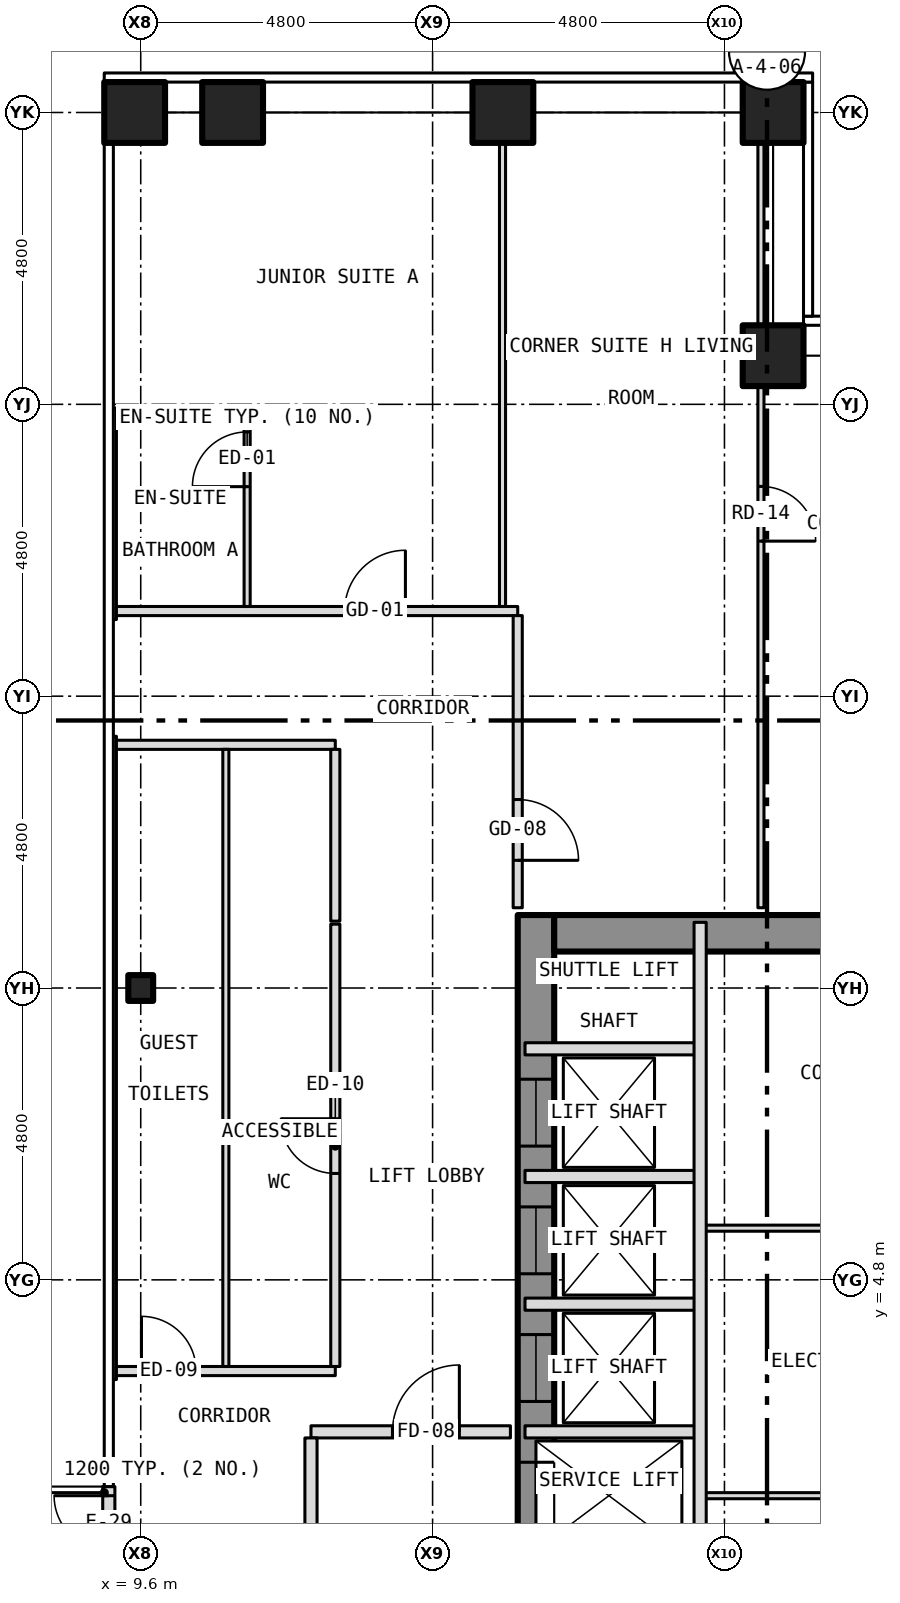
"""IFC4 building model, lengths in metres.
Left out: names, types, materials, properties, quantities, classifications, styles, units other than length and angle.
Written with IfcOpenShell. Run it as: python <this file> out.ifc"""

import sys

from ifc_helpers import new_model, si_unit, direction, frame, frame_2d, origin, origin_2d, place, context, subcontext, project, spatial, rectangle, hollow_rectangle, i_section, extrude, element, fill, save


model = new_model("IFC4")
c1 = context("Model", 3, precision=1e-05, world=origin(), true_north=direction((0.0, 1.0)))
c2 = subcontext(c1, "Body", "Model", "MODEL_VIEW")
j1 = project(units=[si_unit("LENGTHUNIT", "METRE"), si_unit("PLANEANGLEUNIT", "RADIAN")], contexts=[c1])
p1 = place(None, origin())
s1 = spatial("IfcSite", under=j1, at=p1, CompositionType="ELEMENT")
p2 = place(p1, origin())
s2 = spatial("IfcBuilding", under=s1, at=p2, CompositionType="ELEMENT")
p3 = place(p2, frame((0.0, 0.0, 70.5)))
s3 = spatial("IfcBuildingStorey", under=s2, at=p3, CompositionType="ELEMENT", Elevation=70.5)
for number, where, z_axis, x_axis in (
    (1, (11.111, 24.0, -0.15), (0.0, 0.0, 1.0), (1.0, 0.0, 0.0)),
    (2, (15.556, 24.0, -0.15), (0.0, 0.0, 1.0), (1.0, 0.0, 0.0)),
    (3, (20.0, 24.0, -0.15), (0.0, 0.0, 1.0), (1.0, 0.0, 0.0)),
    (4, (20.0, 20.0, -0.15), (0.0, 0.0, 1.0), (1.0, 0.0, 0.0)),
    (5, (9.5, 24.0, -0.15), (0.0, 0.0, 1.0), (1.0, 0.0, 0.0)),
):
    element("IfcColumn", number, at=place(p3, frame(where, z_axis=z_axis, x_axis=x_axis)), inside=s3, PredefinedType="COLUMN", context=c2, shape_type="SweptSolid", body=[
        extrude(hollow_rectangle(XDim=1.0, YDim=1.0, WallThickness=0.06, at=origin_2d()), origin(), (0.0, 0.0, 1.0), 3.5),
    ])
p4 = place(p3, frame((9.6, 9.6, -0.15), z_axis=(0.0, 0.0, 1.0), x_axis=(1.0, 0.0, 0.0)))
e6 = element("IfcColumn", 6, at=p4, inside=s3, PredefinedType="COLUMN", context=c2, shape_type="SweptSolid", body=[
    extrude(i_section(OverallWidth=0.409, OverallDepth=0.424, WebThickness=0.033, FlangeThickness=0.052, at=origin_2d()), origin(), (0.0, 0.0, 1.0), 3.5),
])
p5 = place(p3, frame((16.1, -10.8, 0.0), z_axis=(0.0, 0.0, 1.0), x_axis=(0.0, 1.0, 0.0)))
e7 = element("IfcWall", 7, at=p5, inside=s3, PredefinedType="SHEAR", context=c2, shape_type="SweptSolid", body=[
    extrude(rectangle(XDim=21.6, YDim=0.6, at=frame_2d((10.8, 0.0))), origin(), (0.0, 0.0, 1.0), 3.25),
])
p6 = place(p5, frame((9.4, 0.0, 0.0)))
e8 = element("IfcOpeningElement", 8, at=p6, cuts=e7, PredefinedType="OPENING", context=c2, shape_type="SweptSolid", body=[
    extrude(rectangle(XDim=1.1, YDim=2.1, at=frame_2d((0.55, 1.05))), frame((0.0, 0.312, 0.0), z_axis=(0.0, -1.0, 0.0), x_axis=(1.0, 0.0, 0.0)), (0.0, 0.0, 1.0), 0.624),
])
p7 = place(p5, frame((11.5, 0.0, 0.0)))
e9 = element("IfcOpeningElement", 9, at=p7, cuts=e7, PredefinedType="OPENING", context=c2, shape_type="SweptSolid", body=[
    extrude(rectangle(XDim=1.1, YDim=2.1, at=frame_2d((0.55, 1.05))), frame((0.0, 0.312, 0.0), z_axis=(0.0, -1.0, 0.0), x_axis=(1.0, 0.0, 0.0)), (0.0, 0.0, 1.0), 0.624),
])
p8 = place(p5, frame((13.6, 0.0, 0.0)))
e10 = element("IfcOpeningElement", 10, at=p8, cuts=e7, PredefinedType="OPENING", context=c2, shape_type="SweptSolid", body=[
    extrude(rectangle(XDim=1.1, YDim=2.1, at=frame_2d((0.55, 1.05))), frame((0.0, 0.312, 0.0), z_axis=(0.0, -1.0, 0.0), x_axis=(1.0, 0.0, 0.0)), (0.0, 0.0, 1.0), 0.624),
])
p9 = place(p5, frame((15.7, 0.0, 0.0)))
e11 = element("IfcOpeningElement", 11, at=p9, cuts=e7, PredefinedType="OPENING", context=c2, shape_type="SweptSolid", body=[
    extrude(rectangle(XDim=1.1, YDim=2.1, at=frame_2d((0.55, 1.05))), frame((0.0, 0.312, 0.0), z_axis=(0.0, -1.0, 0.0), x_axis=(1.0, 0.0, 0.0)), (0.0, 0.0, 1.0), 0.624),
])
p10 = place(p5, frame((17.8, 0.0, 0.0)))
e12 = element("IfcOpeningElement", 12, at=p10, cuts=e7, PredefinedType="OPENING", context=c2, shape_type="SweptSolid", body=[
    extrude(rectangle(XDim=1.1, YDim=2.1, at=frame_2d((0.55, 1.05))), frame((0.0, 0.312, 0.0), z_axis=(0.0, -1.0, 0.0), x_axis=(1.0, 0.0, 0.0)), (0.0, 0.0, 1.0), 0.624),
])
p11 = place(p5, frame((5.642, 0.0, 0.0)))
e13 = element("IfcOpeningElement", 13, at=p11, cuts=e7, PredefinedType="OPENING", context=c2, shape_type="SweptSolid", body=[
    extrude(rectangle(XDim=1.1, YDim=2.1, at=frame_2d((0.55, 1.05))), frame((0.0, 0.312, 0.0), z_axis=(0.0, -1.0, 0.0), x_axis=(1.0, 0.0, 0.0)), (0.0, 0.0, 1.0), 0.624),
])
p12 = place(p5, frame((7.5, 0.0, 0.0)))
e14 = element("IfcOpeningElement", 14, at=p12, cuts=e7, PredefinedType="OPENING", context=c2, shape_type="SweptSolid", body=[
    extrude(rectangle(XDim=1.1, YDim=2.1, at=frame_2d((0.55, 1.05))), frame((0.0, 0.312, 0.0), z_axis=(0.0, -1.0, 0.0), x_axis=(1.0, 0.0, 0.0)), (0.0, 0.0, 1.0), 0.624),
])
p13 = place(p3, frame((16.4, 10.5, 0.0), z_axis=(0.0, 0.0, 1.0), x_axis=(1.0, 0.0, 0.0)))
e15 = element("IfcWall", 15, at=p13, inside=s3, PredefinedType="SHEAR", context=c2, shape_type="SweptSolid", body=[
    extrude(rectangle(XDim=7.0, YDim=0.6, at=frame_2d((3.5, 0.0))), origin(), (0.0, 0.0, 1.0), 3.25),
])
p14 = place(p3, frame((9.075, -1.4, 0.0), z_axis=(0.0, 0.0, 1.0), x_axis=(0.0, 1.0, 0.0)))
e16 = element("IfcWall", 16, at=p14, inside=s3, PredefinedType="SOLIDWALL", context=c2, shape_type="SweptSolid", body=[
    extrude(rectangle(XDim=2.8, YDim=0.2, at=frame_2d((1.4, 0.0))), origin(), (0.0, 0.0, 1.0), 3.5),
])
p15 = place(p14, frame((0.15, 0.0, 0.0)))
e17 = element("IfcOpeningElement", 17, at=p15, cuts=e16, PredefinedType="OPENING", context=c2, shape_type="SweptSolid", body=[
    extrude(rectangle(XDim=0.9, YDim=2.1, at=frame_2d((0.45, 1.05))), frame((0.0, 0.112, 0.0), z_axis=(0.0, -1.0, 0.0), x_axis=(1.0, 0.0, 0.0)), (0.0, 0.0, 1.0), 0.224),
])
p16 = place(p14, frame((1.75, 0.0, 0.0)))
e18 = element("IfcOpeningElement", 18, at=p16, cuts=e16, PredefinedType="OPENING", context=c2, shape_type="SweptSolid", body=[
    extrude(rectangle(XDim=0.9, YDim=2.1, at=frame_2d((0.45, 1.05))), frame((0.0, 0.112, 0.0), z_axis=(0.0, -1.0, 0.0), x_axis=(1.0, 0.0, 0.0)), (0.0, 0.0, 1.0), 0.224),
])
p17 = place(p3, frame((18.8, 1.25, 0.0), z_axis=(0.0, 0.0, 1.0), x_axis=(1.0, 0.0, 0.0)))
e19 = element("IfcWall", 19, at=p17, inside=s3, PredefinedType="PARTITIONING", context=c2, shape_type="SweptSolid", body=[
    extrude(rectangle(XDim=5.08, YDim=0.1, at=frame_2d((2.54, 0.0))), origin(), (0.0, 0.0, 1.0), 3.25),
])
p18 = place(p17, frame((2.15, 0.0, 0.0)))
e20 = element("IfcOpeningElement", 20, at=p18, cuts=e19, PredefinedType="OPENING", context=c2, shape_type="SweptSolid", body=[
    extrude(rectangle(XDim=0.9, YDim=2.1, at=frame_2d((0.45, 1.05))), frame((0.0, 0.062, 0.0), z_axis=(0.0, -1.0, 0.0), x_axis=(1.0, 0.0, 0.0)), (0.0, 0.0, 1.0), 0.124),
])
p19 = place(p3, frame((12.4, 2.3, 0.0), z_axis=(0.0, 0.0, 1.0), x_axis=(1.0, 0.0, 0.0)))
e21 = element("IfcWall", 21, at=p19, inside=s3, PredefinedType="PARTITIONING", context=c2, shape_type="SweptSolid", body=[
    extrude(rectangle(XDim=3.28, YDim=0.2, at=frame_2d((1.64, 0.0))), origin(), (0.0, 0.0, 1.0), 3.35),
])
p20 = place(p19, frame((1.34, 0.0, 0.0)))
e22 = element("IfcOpeningElement", 22, at=p20, cuts=e21, PredefinedType="OPENING", context=c2, shape_type="SweptSolid", body=[
    extrude(rectangle(XDim=1.1, YDim=2.1, at=frame_2d((0.55, 1.05))), frame((0.0, 0.112, 0.0), z_axis=(0.0, -1.0, 0.0), x_axis=(1.0, 0.0, 0.0)), (0.0, 0.0, 1.0), 0.224),
])
p21 = place(p3, frame((15.92, 2.3, 0.0), z_axis=(0.0, 0.0, 1.0), x_axis=(1.0, 0.0, 0.0)))
e23 = element("IfcWall", 23, at=p21, inside=s3, PredefinedType="PARTITIONING", context=c2, shape_type="SweptSolid", body=[
    extrude(rectangle(XDim=2.88, YDim=0.2, at=frame_2d((1.44, 0.0))), origin(), (0.0, 0.0, 1.0), 3.25),
])
p22 = place(p3, frame((9.15, 3.3, 0.0), z_axis=(0.0, 0.0, 1.0), x_axis=(1.0, 0.0, 0.0)))
e24 = element("IfcWall", 24, at=p22, inside=s3, PredefinedType="PARTITIONING", context=c2, shape_type="SweptSolid", body=[
    extrude(rectangle(XDim=3.65, YDim=0.15, at=frame_2d((1.825, 0.0))), origin(), (0.0, 0.0, 1.0), 3.35),
])
p23 = place(p22, frame((0.462, 0.0, 0.0)))
e25 = element("IfcOpeningElement", 25, at=p23, cuts=e24, PredefinedType="OPENING", context=c2, shape_type="SweptSolid", body=[
    extrude(rectangle(XDim=0.9, YDim=2.1, at=frame_2d((0.45, 1.05))), frame((0.0, 0.087, 0.0), z_axis=(0.0, -1.0, 0.0), x_axis=(1.0, 0.0, 0.0)), (0.0, 0.0, 1.0), 0.174),
])
p24 = place(p3, frame((15.92, 4.4, 0.0), z_axis=(0.0, 0.0, 1.0), x_axis=(1.0, 0.0, 0.0)))
e26 = element("IfcWall", 26, at=p24, inside=s3, PredefinedType="PARTITIONING", context=c2, shape_type="SweptSolid", body=[
    extrude(rectangle(XDim=2.88, YDim=0.2, at=frame_2d((1.44, 0.0))), origin(), (0.0, 0.0, 1.0), 3.25),
])
p25 = place(p3, frame((18.8, 5.65, 0.0), z_axis=(0.0, 0.0, 1.0), x_axis=(1.0, 0.0, 0.0)))
e27 = element("IfcWall", 27, at=p25, inside=s3, PredefinedType="PARTITIONING", context=c2, shape_type="SweptSolid", body=[
    extrude(rectangle(XDim=5.08, YDim=0.1, at=frame_2d((2.54, 0.0))), origin(), (0.0, 0.0, 1.0), 3.25),
])
p26 = place(p25, frame((2.15, 0.0, 0.0)))
e28 = element("IfcOpeningElement", 28, at=p26, cuts=e27, PredefinedType="OPENING", context=c2, shape_type="SweptSolid", body=[
    extrude(rectangle(XDim=0.9, YDim=2.1, at=frame_2d((0.45, 1.05))), frame((0.0, 0.062, 0.0), z_axis=(0.0, -1.0, 0.0), x_axis=(1.0, 0.0, 0.0)), (0.0, 0.0, 1.0), 0.124),
])
for number, where, z_axis, x_axis in (
    (29, (15.92, 6.5, 0.0), (0.0, 0.0, 1.0), (1.0, 0.0, 0.0)),
    (30, (15.92, 8.6, 0.0), (0.0, 0.0, 1.0), (1.0, 0.0, 0.0)),
):
    element("IfcWall", number, at=place(p3, frame(where, z_axis=z_axis, x_axis=x_axis)), inside=s3, PredefinedType="PARTITIONING", context=c2, shape_type="SweptSolid", body=[
        extrude(rectangle(XDim=2.88, YDim=0.2, at=frame_2d((1.44, 0.0))), origin(), (0.0, 0.0, 1.0), 3.25),
    ])
p27 = place(p3, frame((9.15, 13.6, 0.0), z_axis=(0.0, 0.0, 1.0), x_axis=(1.0, 0.0, 0.0)))
e31 = element("IfcWall", 31, at=p27, inside=s3, PredefinedType="PARTITIONING", context=c2, shape_type="SweptSolid", body=[
    extrude(rectangle(XDim=3.65, YDim=0.15, at=frame_2d((1.825, 0.0))), origin(), (0.0, 0.0, 1.0), 3.35),
])
p28 = place(p3, frame((9.15, 15.8, 0.0), z_axis=(0.0, 0.0, 1.0), x_axis=(1.0, 0.0, 0.0)))
e32 = element("IfcWall", 32, at=p28, inside=s3, PredefinedType="PARTITIONING", context=c2, shape_type="SweptSolid", body=[
    extrude(rectangle(XDim=6.65, YDim=0.15, at=frame_2d((3.325, 0.0))), origin(), (0.0, 0.0, 1.0), 3.35),
])
p29 = place(p28, frame((3.803, 0.0, 0.0)))
e33 = element("IfcOpeningElement", 33, at=p29, cuts=e32, PredefinedType="OPENING", context=c2, shape_type="SweptSolid", body=[
    extrude(rectangle(XDim=1.0, YDim=2.1, at=frame_2d((0.5, 1.05))), frame((0.0, 0.087, 0.0), z_axis=(0.0, -1.0, 0.0), x_axis=(1.0, 0.0, 0.0)), (0.0, 0.0, 1.0), 0.174),
])
p30 = place(p3, frame((9.15, 19.0, 0.0), z_axis=(0.0, 0.0, 1.0), x_axis=(1.0, 0.0, 0.0)))
e34 = element("IfcWall", 34, at=p30, inside=s3, PredefinedType="PARTITIONING", context=c2, shape_type="SweptSolid", body=[
    extrude(rectangle(XDim=2.2, YDim=0.1, at=frame_2d((1.1, 0.0))), origin(), (0.0, 0.0, 1.0), 3.35),
])
p31 = place(p3, frame((9.15, 3.16, 0.0), z_axis=(0.0, 0.0, 1.0), x_axis=(0.0, 1.0, 0.0)))
e35 = element("IfcWall", 35, at=p31, inside=s3, PredefinedType="PARTITIONING", context=c2, shape_type="SweptSolid", body=[
    extrude(rectangle(XDim=10.58, YDim=0.1, at=frame_2d((5.29, 0.0))), origin(), (0.0, 0.0, 1.0), 2.733),
])
p32 = place(p3, frame((9.15, 15.66, 0.0), z_axis=(0.0, 0.0, 1.0), x_axis=(0.0, 1.0, 0.0)))
e36 = element("IfcWall", 36, at=p32, inside=s3, PredefinedType="PARTITIONING", context=c2, shape_type="SweptSolid", body=[
    extrude(rectangle(XDim=3.48, YDim=0.1, at=frame_2d((1.74, 0.0))), origin(), (0.0, 0.0, 1.0), 2.733),
])
p33 = place(p3, frame((11.0, 3.375, 0.0), z_axis=(0.0, 0.0, 1.0), x_axis=(0.0, 1.0, 0.0)))
e37 = element("IfcWall", 37, at=p33, inside=s3, PredefinedType="PARTITIONING", context=c2, shape_type="SweptSolid", body=[
    extrude(rectangle(XDim=10.15, YDim=0.1, at=frame_2d((5.075, 0.0))), origin(), (0.0, 0.0, 1.0), 3.35),
])
p34 = place(p3, frame((11.35, 15.875, 0.0), z_axis=(0.0, 0.0, 1.0), x_axis=(0.0, 1.0, 0.0)))
e38 = element("IfcWall", 38, at=p34, inside=s3, PredefinedType="PARTITIONING", context=c2, shape_type="SweptSolid", body=[
    extrude(rectangle(XDim=3.075, YDim=0.1, at=frame_2d((1.538, 0.0))), origin(), (0.0, 0.0, 1.0), 3.35),
])
p35 = place(p34, frame((1.971, 0.0, 0.0)))
e39 = element("IfcOpeningElement", 39, at=p35, cuts=e38, PredefinedType="OPENING", context=c2, shape_type="SweptSolid", body=[
    extrude(rectangle(XDim=0.9, YDim=2.1, at=frame_2d((0.45, 1.05))), frame((0.0, 0.062, 0.0), z_axis=(0.0, -1.0, 0.0), x_axis=(1.0, 0.0, 0.0)), (0.0, 0.0, 1.0), 0.124),
])
p36 = place(p3, frame((12.4, -1.8, 0.0), z_axis=(0.0, 0.0, 1.0), x_axis=(0.0, 1.0, 0.0)))
e40 = element("IfcWall", 40, at=p36, inside=s3, PredefinedType="PARTITIONING", context=c2, shape_type="SweptSolid", body=[
    extrude(rectangle(XDim=4.0, YDim=0.2, at=frame_2d((2.0, 0.0))), origin(), (0.0, 0.0, 1.0), 3.35),
])
p37 = place(p36, frame((1.25, 0.0, 0.0)))
e41 = element("IfcOpeningElement", 41, at=p37, cuts=e40, PredefinedType="OPENING", context=c2, shape_type="SweptSolid", body=[
    extrude(rectangle(XDim=1.1, YDim=2.1, at=frame_2d((0.55, 1.05))), frame((0.0, 0.112, 0.0), z_axis=(0.0, -1.0, 0.0), x_axis=(1.0, 0.0, 0.0)), (0.0, 0.0, 1.0), 0.224),
])
p38 = place(p3, frame((12.8, 3.375, 0.0), z_axis=(0.0, 0.0, 1.0), x_axis=(0.0, 1.0, 0.0)))
e42 = element("IfcWall", 42, at=p38, inside=s3, PredefinedType="PARTITIONING", context=c2, shape_type="SweptSolid", body=[
    extrude(rectangle(XDim=7.275, YDim=0.15, at=frame_2d((3.637, 0.0))), origin(), (0.0, 0.0, 1.0), 3.35),
])
p39 = place(p38, frame((3.175, 0.0, 0.0)))
e43 = element("IfcOpeningElement", 43, at=p39, cuts=e42, PredefinedType="OPENING", context=c2, shape_type="SweptSolid", body=[
    extrude(rectangle(XDim=0.9, YDim=2.1, at=frame_2d((0.45, 1.05))), frame((0.0, 0.087, 0.0), z_axis=(0.0, -1.0, 0.0), x_axis=(1.0, 0.0, 0.0)), (0.0, 0.0, 1.0), 0.174),
])
p40 = place(p3, frame((12.8, 10.7, 0.0), z_axis=(0.0, 0.0, 1.0), x_axis=(0.0, 1.0, 0.0)))
e44 = element("IfcWall", 44, at=p40, inside=s3, PredefinedType="PARTITIONING", context=c2, shape_type="SweptSolid", body=[
    extrude(rectangle(XDim=2.825, YDim=0.15, at=frame_2d((1.413, 0.0))), origin(), (0.0, 0.0, 1.0), 3.35),
])
p41 = place(p3, frame((15.55, 15.875, 0.0), z_axis=(0.0, 0.0, 1.0), x_axis=(0.0, 1.0, 0.0)))
e45 = element("IfcWall", 45, at=p41, inside=s3, PredefinedType="PARTITIONING", context=c2, shape_type="SweptSolid", body=[
    extrude(rectangle(XDim=8.005, YDim=0.1, at=frame_2d((4.002, 0.0))), origin(), (0.0, 0.0, 1.0), 3.35),
])
p42 = place(p3, frame((15.8, 10.92, 0.0), z_axis=(0.0, 0.0, 1.0), x_axis=(0.0, 1.0, 0.0)))
e46 = element("IfcWall", 46, at=p42, inside=s3, PredefinedType="PARTITIONING", context=c2, shape_type="SweptSolid", body=[
    extrude(rectangle(XDim=4.805, YDim=0.15, at=frame_2d((2.403, 0.0))), origin(), (0.0, 0.0, 1.0), 3.35),
])
p43 = place(p42, frame((0.78, 0.0, 0.0)))
e47 = element("IfcOpeningElement", 47, at=p43, cuts=e46, PredefinedType="OPENING", context=c2, shape_type="SweptSolid", body=[
    extrude(rectangle(XDim=1.0, YDim=2.1, at=frame_2d((0.5, 1.05))), frame((0.0, 0.087, 0.0), z_axis=(0.0, -1.0, 0.0), x_axis=(1.0, 0.0, 0.0)), (0.0, 0.0, 1.0), 0.174),
])
p44 = place(p3, frame((18.8, -1.8, 0.0), z_axis=(0.0, 0.0, 1.0), x_axis=(0.0, 1.0, 0.0)))
e48 = element("IfcWall", 48, at=p44, inside=s3, PredefinedType="PARTITIONING", context=c2, shape_type="SweptSolid", body=[
    extrude(rectangle(XDim=12.48, YDim=0.2, at=frame_2d((6.24, 0.0))), origin(), (0.0, 0.0, 1.0), 3.25),
])
p45 = place(p3, frame((19.8, 10.92, 0.0), z_axis=(0.0, 0.0, 1.0), x_axis=(0.0, 1.0, 0.0)))
e49 = element("IfcWall", 49, at=p45, inside=s3, PredefinedType="PARTITIONING", context=c2, shape_type="SweptSolid", body=[
    extrude(rectangle(XDim=12.96, YDim=0.1, at=frame_2d((6.48, 0.0))), origin(), (0.0, 0.0, 1.0), 3.35),
])
p46 = place(p45, frame((6.03, 0.0, 0.0)))
e50 = element("IfcOpeningElement", 50, at=p46, cuts=e49, PredefinedType="OPENING", context=c2, shape_type="SweptSolid", body=[
    extrude(rectangle(XDim=0.9, YDim=2.1, at=frame_2d((0.45, 1.05))), frame((0.0, 0.062, 0.0), z_axis=(0.0, -1.0, 0.0), x_axis=(1.0, 0.0, 0.0)), (0.0, 0.0, 1.0), 0.124),
])
p47 = place(p16, origin())
e51 = element("IfcDoor", 51, at=p47, inside=s3, OperationType="SINGLE_SWING_RIGHT", PredefinedType="DOOR", context=c2, shape_type="SweptSolid", body=[
    extrude(rectangle(XDim=0.9, YDim=2.1, at=frame_2d((0.45, 1.05))), frame((0.0, 0.025, 0.0), z_axis=(0.0, -1.0, 0.0), x_axis=(1.0, 0.0, 0.0)), (0.0, 0.0, 1.0), 0.05),
])
fill(e18, e51)
p48 = place(p7, origin())
e52 = element("IfcDoor", 52, at=p48, inside=s3, OperationType="SLIDING_TO_LEFT", PredefinedType="DOOR", context=c2, shape_type="SweptSolid", body=[
    extrude(rectangle(XDim=1.1, YDim=2.1, at=frame_2d((0.55, 1.05))), frame((0.0, 0.025, 0.0), z_axis=(0.0, -1.0, 0.0), x_axis=(1.0, 0.0, 0.0)), (0.0, 0.0, 1.0), 0.05),
])
fill(e9, e52)
p49 = place(p8, origin())
e53 = element("IfcDoor", 53, at=p49, inside=s3, OperationType="SLIDING_TO_LEFT", PredefinedType="DOOR", context=c2, shape_type="SweptSolid", body=[
    extrude(rectangle(XDim=1.1, YDim=2.1, at=frame_2d((0.55, 1.05))), frame((0.0, 0.025, 0.0), z_axis=(0.0, -1.0, 0.0), x_axis=(1.0, 0.0, 0.0)), (0.0, 0.0, 1.0), 0.05),
])
fill(e10, e53)
p50 = place(p9, origin())
e54 = element("IfcDoor", 54, at=p50, inside=s3, OperationType="SLIDING_TO_LEFT", PredefinedType="DOOR", context=c2, shape_type="SweptSolid", body=[
    extrude(rectangle(XDim=1.1, YDim=2.1, at=frame_2d((0.55, 1.05))), frame((0.0, 0.025, 0.0), z_axis=(0.0, -1.0, 0.0), x_axis=(1.0, 0.0, 0.0)), (0.0, 0.0, 1.0), 0.05),
])
fill(e11, e54)
p51 = place(p10, origin())
e55 = element("IfcDoor", 55, at=p51, inside=s3, OperationType="SLIDING_TO_LEFT", PredefinedType="DOOR", context=c2, shape_type="SweptSolid", body=[
    extrude(rectangle(XDim=1.1, YDim=2.1, at=frame_2d((0.55, 1.05))), frame((0.0, 0.025, 0.0), z_axis=(0.0, -1.0, 0.0), x_axis=(1.0, 0.0, 0.0)), (0.0, 0.0, 1.0), 0.05),
])
fill(e12, e55)
p52 = place(p20, origin())
e56 = element("IfcDoor", 56, at=p52, inside=s3, OperationType="SINGLE_SWING_RIGHT", PredefinedType="DOOR", context=c2, shape_type="SweptSolid", body=[
    extrude(rectangle(XDim=1.1, YDim=2.1, at=frame_2d((0.55, 1.05))), frame((0.0, 0.025, 0.0), z_axis=(0.0, -1.0, 0.0), x_axis=(1.0, 0.0, 0.0)), (0.0, 0.0, 1.0), 0.05),
])
fill(e22, e56)
p53 = place(p29, origin())
e57 = element("IfcDoor", 57, at=p53, inside=s3, OperationType="SINGLE_SWING_RIGHT", PredefinedType="DOOR", context=c2, shape_type="SweptSolid", body=[
    extrude(rectangle(XDim=1.0, YDim=2.1, at=frame_2d((0.5, 1.05))), frame((0.0, 0.025, 0.0), z_axis=(0.0, -1.0, 0.0), x_axis=(1.0, 0.0, 0.0)), (0.0, 0.0, 1.0), 0.05),
])
fill(e33, e57)
p54 = place(p35, origin())
e58 = element("IfcDoor", 58, at=p54, inside=s3, OperationType="SINGLE_SWING_LEFT", PredefinedType="DOOR", context=c2, shape_type="SweptSolid", body=[
    extrude(rectangle(XDim=0.9, YDim=2.1, at=frame_2d((0.45, 1.05))), frame((0.0, 0.025, 0.0), z_axis=(0.0, -1.0, 0.0), x_axis=(1.0, 0.0, 0.0)), (0.0, 0.0, 1.0), 0.05),
])
fill(e39, e58)
p55 = place(p43, origin())
e59 = element("IfcDoor", 59, at=p55, inside=s3, OperationType="SINGLE_SWING_LEFT", PredefinedType="DOOR", context=c2, shape_type="SweptSolid", body=[
    extrude(rectangle(XDim=1.0, YDim=2.1, at=frame_2d((0.5, 1.05))), frame((0.0, 0.025, 0.0), z_axis=(0.0, -1.0, 0.0), x_axis=(1.0, 0.0, 0.0)), (0.0, 0.0, 1.0), 0.05),
])
fill(e47, e59)
p56 = place(p46, origin())
e60 = element("IfcDoor", 60, at=p56, inside=s3, OperationType="SINGLE_SWING_LEFT", PredefinedType="DOOR", context=c2, shape_type="SweptSolid", body=[
    extrude(rectangle(XDim=0.9, YDim=2.1, at=frame_2d((0.45, 1.05))), frame((0.0, 0.025, 0.0), z_axis=(0.0, -1.0, 0.0), x_axis=(1.0, 0.0, 0.0)), (0.0, 0.0, 1.0), 0.05),
])
fill(e50, e60)
p57 = place(p23, origin())
e61 = element("IfcDoor", 61, at=p57, inside=s3, OperationType="SINGLE_SWING_LEFT", PredefinedType="DOOR", context=c2, shape_type="SweptSolid", body=[
    extrude(rectangle(XDim=0.9, YDim=2.1, at=frame_2d((0.45, 1.05))), frame((0.0, 0.025, 0.0), z_axis=(0.0, -1.0, 0.0), x_axis=(1.0, 0.0, 0.0)), (0.0, 0.0, 1.0), 0.05),
])
fill(e25, e61)
p58 = place(p39, origin())
e62 = element("IfcDoor", 62, at=p58, inside=s3, OperationType="SINGLE_SWING_RIGHT", PredefinedType="DOOR", context=c2, shape_type="SweptSolid", body=[
    extrude(rectangle(XDim=0.9, YDim=2.1, at=frame_2d((0.45, 1.05))), frame((0.0, 0.025, 0.0), z_axis=(0.0, -1.0, 0.0), x_axis=(1.0, 0.0, 0.0)), (0.0, 0.0, 1.0), 0.05),
])
fill(e43, e62)
save(model, sys.argv[1])
